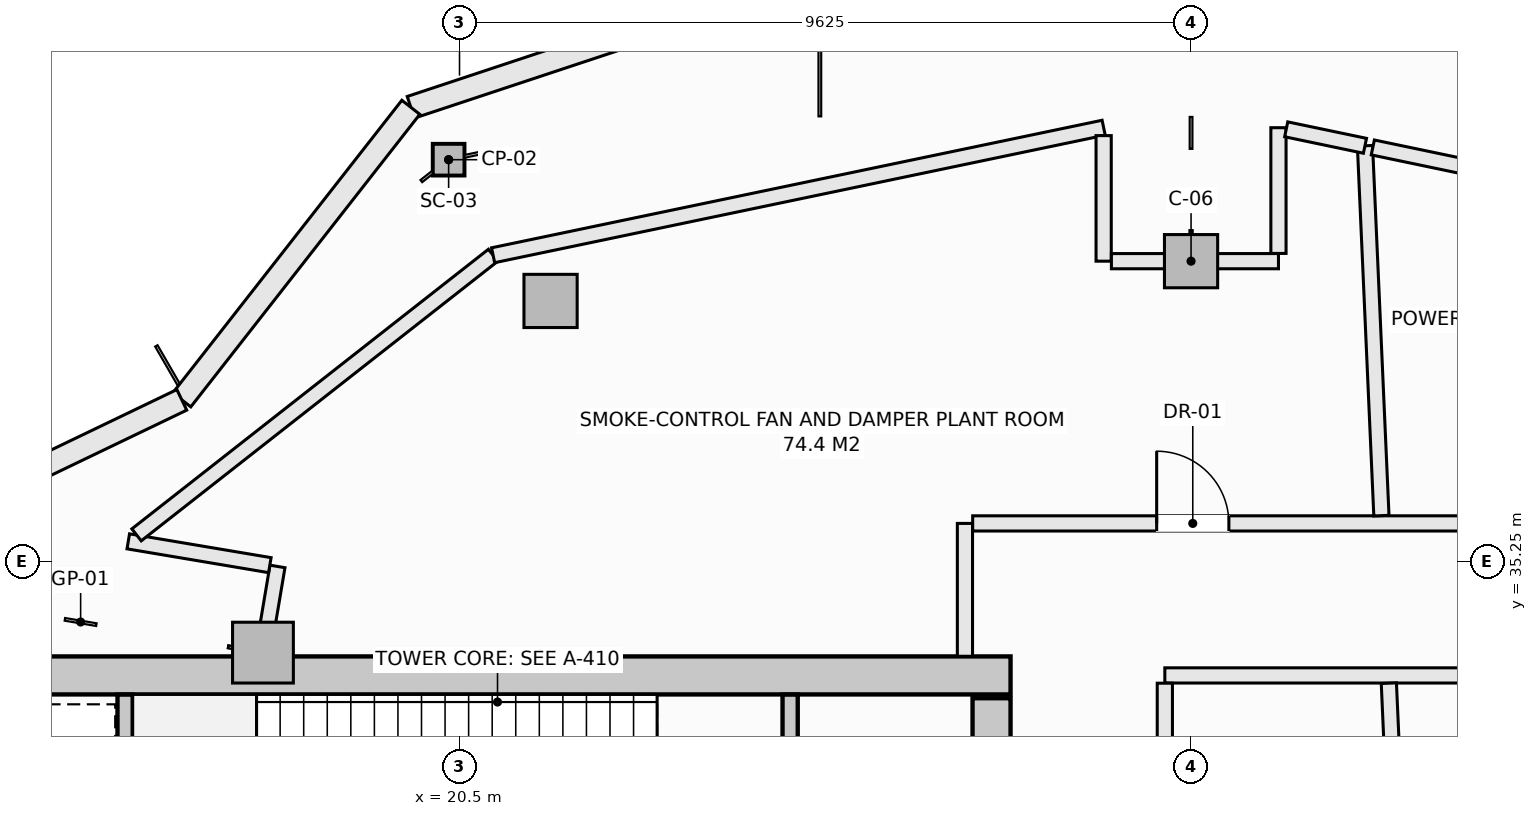
"""IFC4 building model, lengths in metres.
Left out: names, types, materials, properties, quantities, classifications, styles, units other than length and angle.
Written with IfcOpenShell. Run it as: python <this file> out.ifc"""

import sys

from ifc_helpers import new_model, si_unit, direction, frame, frame_2d, origin, origin_2d, place, context, subcontext, project, spatial, rectangle, hollow_rectangle, extrude, element, fill, save


model = new_model("IFC4")
c1 = context("Model", 3, precision=1e-05, world=origin(), true_north=direction((0.0, 1.0)))
c2 = subcontext(c1, "Body", "Model", "MODEL_VIEW")
j1 = project(units=[si_unit("LENGTHUNIT", "METRE"), si_unit("PLANEANGLEUNIT", "RADIAN")], contexts=[c1])
p1 = place(None, origin())
s1 = spatial("IfcSite", under=j1, at=p1, CompositionType="ELEMENT")
p2 = place(p1, origin())
s2 = spatial("IfcBuilding", under=s1, at=p2, CompositionType="ELEMENT")
p3 = place(p2, frame((0.0, 0.0, 275.6)))
s3 = spatial("IfcBuildingStorey", under=s2, at=p3, CompositionType="ELEMENT", Elevation=275.6)
p4 = place(p3, frame((14.25, 33.75, -0.32), z_axis=(0.0, 0.0, 1.0), x_axis=(1.0, 0.0, 0.0)))
e1 = element("IfcWall", 1, at=p4, inside=s3, PredefinedType="SHEAR", context=c2, shape_type="SweptSolid", body=[
    extrude(rectangle(XDim=13.5, YDim=0.5, at=frame_2d((6.75, 0.0))), origin(), (0.0, 0.0, 1.0), 6.04),
])
p5 = place(p3, frame((27.5, 31.95, -0.32), z_axis=(0.0, 0.0, 1.0), x_axis=(0.0, 1.0, 0.0)))
e2 = element("IfcWall", 2, at=p5, inside=s3, PredefinedType="SHEAR", context=c2, shape_type="SweptSolid", body=[
    extrude(rectangle(XDim=1.5, YDim=0.5, at=frame_2d((0.75, 0.0))), origin(), (0.0, 0.0, 1.0), 6.04),
])
p6 = place(p3, frame((20.357, 40.535, -0.32), z_axis=(0.0, 0.0, 1.0), x_axis=(1.0, 0.0, 0.0)))
e3 = element("IfcColumn", 3, at=p6, inside=s3, PredefinedType="COLUMN", context=c2, shape_type="SweptSolid", body=[
    extrude(hollow_rectangle(XDim=0.406, YDim=0.406, WallThickness=0.016, at=origin_2d()), origin(), (0.0, 0.0, 1.0), 6.04),
])
for number, where, z_axis, x_axis in (
    (4, (30.125, 39.2, -0.32), (0.0, 0.0, 1.0), (1.0, 0.0, 0.0)),
    (5, (21.698, 38.677, -0.32), (0.0, 0.0, 1.0), (1.0, 0.0, 0.0)),
):
    element("IfcColumn", number, at=place(p3, frame(where, z_axis=z_axis, x_axis=x_axis)), inside=s3, PredefinedType="COLUMN", context=c2, shape_type="SweptSolid", body=[
        extrude(rectangle(XDim=0.7, YDim=0.7, at=origin_2d()), origin(), (0.0, 0.0, 1.0), 6.04),
    ])
p7 = place(p3, frame((17.914, 34.05, -0.32), z_axis=(0.0, 0.0, 1.0), x_axis=(1.0, 0.0, 0.0)))
e6 = element("IfcColumn", 6, at=p7, inside=s3, PredefinedType="PILASTER", context=c2, shape_type="SweptSolid", body=[
    extrude(rectangle(XDim=0.8, YDim=0.8, at=origin_2d()), origin(), (0.0, 0.0, 1.0), 6.04),
])
p8 = place(p3, frame((19.859, 41.225, 0.0), z_axis=(0.0, 0.0, 1.0), x_axis=(0.949252744709, 0.314514271001, 0.0)))
e7 = element("IfcWall", 7, at=p8, inside=s3, PredefinedType="SOLIDWALL", context=c2, shape_type="SweptSolid", body=[
    extrude(rectangle(XDim=5.216, YDim=0.3, at=frame_2d((2.608, 0.0))), origin(), (0.0, 0.0, 1.0), 1.15),
])
p9 = place(p3, frame((16.846, 37.375, 0.0), z_axis=(0.0, 0.0, 1.0), x_axis=(0.616413297421, 0.78742278781, 0.0)))
e8 = element("IfcWall", 8, at=p9, inside=s3, PredefinedType="SOLIDWALL", context=c2, shape_type="SweptSolid", body=[
    extrude(rectangle(XDim=4.888, YDim=0.3, at=frame_2d((2.444, 0.0))), origin(), (0.0, 0.0, 1.0), 1.15),
])
p10 = place(p3, frame((12.344, 35.212, 0.0), z_axis=(0.0, 0.0, 1.0), x_axis=(0.901346013132, 0.433099716706, 0.0)))
e9 = element("IfcWall", 9, at=p10, inside=s3, PredefinedType="SOLIDWALL", context=c2, shape_type="SweptSolid", body=[
    extrude(rectangle(XDim=4.994, YDim=0.3, at=frame_2d((2.497, 0.0))), origin(), (0.0, 0.0, 1.0), 1.15),
])
p11 = place(p3, frame((24.85, 30.46, -0.32), z_axis=(0.0, 0.0, 1.0), x_axis=(0.0, 1.0, 0.0)))
e10 = element("IfcWall", 10, at=p11, inside=s3, PredefinedType="SHEAR", context=c2, shape_type="SweptSolid", body=[
    extrude(rectangle(XDim=3.038, YDim=0.2, at=frame_2d((1.519, 0.0))), origin(), (0.0, 0.0, 1.0), 6.04),
])
p12 = place(p11, frame((0.969, 0.0, 0.32)))
e11 = element("IfcOpeningElement", 11, at=p12, cuts=e10, PredefinedType="OPENING", context=c2, shape_type="SweptSolid", body=[
    extrude(rectangle(XDim=1.1, YDim=2.15, at=frame_2d((0.55, 1.075))), frame((0.0, 0.11, 0.0), z_axis=(0.0, -1.0, 0.0), x_axis=(1.0, 0.0, 0.0)), (0.0, 0.0, 1.0), 0.22),
])
p13 = place(p3, frame((16.1, 30.462, -0.32), z_axis=(0.0, 0.0, 1.0), x_axis=(0.0, 1.0, 0.0)))
e12 = element("IfcWall", 12, at=p13, inside=s3, PredefinedType="SHEAR", context=c2, shape_type="SweptSolid", body=[
    extrude(rectangle(XDim=3.036, YDim=0.2, at=frame_2d((1.518, 0.0))), origin(), (0.0, 0.0, 1.0), 6.04),
])
p14 = place(p3, frame((27.15, 34.002, 0.0), z_axis=(0.0, 0.0, 1.0), x_axis=(0.0, 1.0, 0.0)))
e13 = element("IfcWall", 13, at=p14, inside=s3, PredefinedType="SOLIDWALL", context=c2, shape_type="SweptSolid", body=[
    extrude(rectangle(XDim=1.748, YDim=0.2, at=frame_2d((0.874, 0.0))), origin(), (0.0, 0.0, 1.0), 5.72),
])
p15 = place(p3, frame((27.252, 35.75, 0.0), z_axis=(0.0, 0.0, 1.0), x_axis=(1.0, 0.0, 0.0)))
e14 = element("IfcWall", 14, at=p15, inside=s3, PredefinedType="SOLIDWALL", context=c2, shape_type="SweptSolid", body=[
    extrude(rectangle(XDim=11.446, YDim=0.2, at=frame_2d((5.723, 0.0))), origin(), (0.0, 0.0, 1.0), 5.168),
])
p16 = place(p15, frame((2.421, 0.0, 0.0)))
e15 = element("IfcOpeningElement", 15, at=p16, cuts=e14, PredefinedType="OPENING", context=c2, shape_type="SweptSolid", body=[
    extrude(rectangle(XDim=0.95, YDim=2.1, at=frame_2d((0.475, 1.05))), frame((0.0, 0.11, 0.0), z_axis=(0.0, -1.0, 0.0), x_axis=(1.0, 0.0, 0.0)), (0.0, 0.0, 1.0), 0.22),
])
p17 = place(p15, frame((7.733, 0.0, 0.0)))
e16 = element("IfcOpeningElement", 16, at=p17, cuts=e14, PredefinedType="OPENING", context=c2, shape_type="SweptSolid", body=[
    extrude(rectangle(XDim=0.95, YDim=2.1, at=frame_2d((0.475, 1.05))), frame((0.0, 0.11, 0.0), z_axis=(0.0, -1.0, 0.0), x_axis=(1.0, 0.0, 0.0)), (0.0, 0.0, 1.0), 0.22),
])
p18 = place(p3, frame((29.78, 33.75, 0.0), z_axis=(0.0, 0.0, 1.0), x_axis=(1.0, 0.0, 0.0)))
e17 = element("IfcWall", 17, at=p18, inside=s3, PredefinedType="SOLIDWALL", context=c2, shape_type="SweptSolid", body=[
    extrude(rectangle(XDim=8.918, YDim=0.2, at=frame_2d((4.459, 0.0))), origin(), (0.0, 0.0, 1.0), 5.72),
])
p19 = place(p18, frame((5.25, 0.0, 0.0)))
e18 = element("IfcOpeningElement", 18, at=p19, cuts=e17, PredefinedType="OPENING", context=c2, shape_type="SweptSolid", body=[
    extrude(rectangle(XDim=0.95, YDim=2.1, at=frame_2d((0.475, 1.05))), frame((0.0, 0.11, 0.0), z_axis=(0.0, -1.0, 0.0), x_axis=(1.0, 0.0, 0.0)), (0.0, 0.0, 1.0), 0.22),
])
p20 = place(p3, frame((29.78, 31.12, 0.0), z_axis=(0.0, 0.0, 1.0), x_axis=(0.0, 1.0, 0.0)))
e19 = element("IfcWall", 19, at=p20, inside=s3, PredefinedType="SOLIDWALL", context=c2, shape_type="SweptSolid", body=[
    extrude(rectangle(XDim=2.528, YDim=0.2, at=frame_2d((1.264, 0.0))), origin(), (0.0, 0.0, 1.0), 5.72),
])
p21 = place(p3, frame((32.413, 40.718, 0.0), z_axis=(0.0, 0.0, 1.0), x_axis=(0.044359482004, -0.99901563369, 0.0)))
e20 = element("IfcWall", 20, at=p21, inside=s3, PredefinedType="SOLIDWALL", context=c2, shape_type="SweptSolid", body=[
    extrude(rectangle(XDim=4.871, YDim=0.2, at=frame_2d((2.436, 0.0))), origin(), (0.0, 0.0, 1.0), 5.72),
])
p22 = place(p3, frame((32.727, 33.648, 0.0), z_axis=(0.0, 0.0, 1.0), x_axis=(0.044436288755, -0.999012220266, 0.0)))
e21 = element("IfcWall", 21, at=p22, inside=s3, PredefinedType="SOLIDWALL", context=c2, shape_type="SweptSolid", body=[
    extrude(rectangle(XDim=2.428, YDim=0.2, at=frame_2d((1.214, 0.0))), origin(), (0.0, 0.0, 1.0), 5.72),
])
p23 = place(p3, frame((17.906, 34.002, 0.0), z_axis=(0.0, 0.0, 1.0), x_axis=(0.166182071534, 0.986095086237, 0.0)))
e22 = element("IfcWall", 22, at=p23, inside=s3, PredefinedType="SOLIDWALL", context=c2, shape_type="SweptSolid", body=[
    extrude(rectangle(XDim=1.199, YDim=0.2, at=frame_2d((0.599, 0.0))), origin(), (0.0, 0.0, 1.0), 5.168),
])
p24 = place(p3, frame((16.142, 35.514, 0.0), z_axis=(0.0, 0.0, 1.0), x_axis=(0.986169386929, -0.165740581285, 0.0)))
e23 = element("IfcWall", 23, at=p24, inside=s3, PredefinedType="SOLIDWALL", context=c2, shape_type="SweptSolid", body=[
    extrude(rectangle(XDim=1.888, YDim=0.2, at=frame_2d((0.944, 0.0))), origin(), (0.0, 0.0, 1.0), 5.72),
])
p25 = place(p3, frame((16.25, 35.599, 0.0), z_axis=(0.0, 0.0, 1.0), x_axis=(0.786900594147, 0.617079780038, 0.0)))
e24 = element("IfcWall", 24, at=p25, inside=s3, PredefinedType="SOLIDWALL", context=c2, shape_type="SweptSolid", body=[
    extrude(rectangle(XDim=5.962, YDim=0.2, at=frame_2d((2.981, 0.0))), origin(), (0.0, 0.0, 1.0), 5.72),
])
p26 = place(p3, frame((20.942, 39.278, 0.0), z_axis=(0.0, 0.0, 1.0), x_axis=(0.978873365673, 0.204467439894, 0.0)))
e25 = element("IfcWall", 25, at=p26, inside=s3, PredefinedType="SOLIDWALL", context=c2, shape_type="SweptSolid", body=[
    extrude(rectangle(XDim=8.207, YDim=0.2, at=frame_2d((4.103, 0.0))), origin(), (0.0, 0.0, 1.0), 5.72),
])
p27 = place(p3, frame((28.975, 39.2, 0.0), z_axis=(0.0, 0.0, 1.0), x_axis=(0.0, 1.0, 0.0)))
e26 = element("IfcWall", 26, at=p27, inside=s3, PredefinedType="SOLIDWALL", context=c2, shape_type="SweptSolid", body=[
    extrude(rectangle(XDim=1.652, YDim=0.2, at=frame_2d((0.826, 0.0))), origin(), (0.0, 0.0, 1.0), 5.72),
])
p28 = place(p3, frame((29.077, 39.2, 0.0), z_axis=(0.0, 0.0, 1.0), x_axis=(1.0, 0.0, 0.0)))
e27 = element("IfcWall", 27, at=p28, inside=s3, PredefinedType="SOLIDWALL", context=c2, shape_type="SweptSolid", body=[
    extrude(rectangle(XDim=2.198, YDim=0.2, at=frame_2d((1.099, 0.0))), origin(), (0.0, 0.0, 1.0), 5.168),
])
p29 = place(p3, frame((31.275, 39.302, 0.0), z_axis=(0.0, 0.0, 1.0), x_axis=(0.0, 1.0, 0.0)))
e28 = element("IfcWall", 28, at=p29, inside=s3, PredefinedType="SOLIDWALL", context=c2, shape_type="SweptSolid", body=[
    extrude(rectangle(XDim=1.654, YDim=0.2, at=frame_2d((0.827, 0.0))), origin(), (0.0, 0.0, 1.0), 5.72),
])
p30 = place(p3, frame((31.377, 40.935, 0.0), z_axis=(0.0, 0.0, 1.0), x_axis=(0.97880352916, -0.204801492435, 0.0)))
e29 = element("IfcWall", 29, at=p30, inside=s3, PredefinedType="SOLIDWALL", context=c2, shape_type="SweptSolid", body=[
    extrude(rectangle(XDim=1.059, YDim=0.2, at=frame_2d((0.529, 0.0))), origin(), (0.0, 0.0, 1.0), 5.72),
])
p31 = place(p3, frame((32.516, 40.696, 0.0), z_axis=(0.0, 0.0, 1.0), x_axis=(0.978828735441, -0.204680987576, 0.0)))
e30 = element("IfcWall", 30, at=p31, inside=s3, PredefinedType="SOLIDWALL", context=c2, shape_type="SweptSolid", body=[
    extrude(rectangle(XDim=5.285, YDim=0.2, at=frame_2d((2.643, 0.0))), origin(), (0.0, 0.0, 1.0), 5.72),
])
p32 = place(p16, origin())
e31 = element("IfcDoor", 31, at=p32, inside=s3, OperationType="SINGLE_SWING_LEFT", PredefinedType="DOOR", context=c2, shape_type="SweptSolid", body=[
    extrude(rectangle(XDim=0.95, YDim=2.1, at=frame_2d((0.475, 1.05))), frame((0.0, 0.025, 0.0), z_axis=(0.0, -1.0, 0.0), x_axis=(1.0, 0.0, 0.0)), (0.0, 0.0, 1.0), 0.05),
])
fill(e15, e31)
save(model, sys.argv[1])
